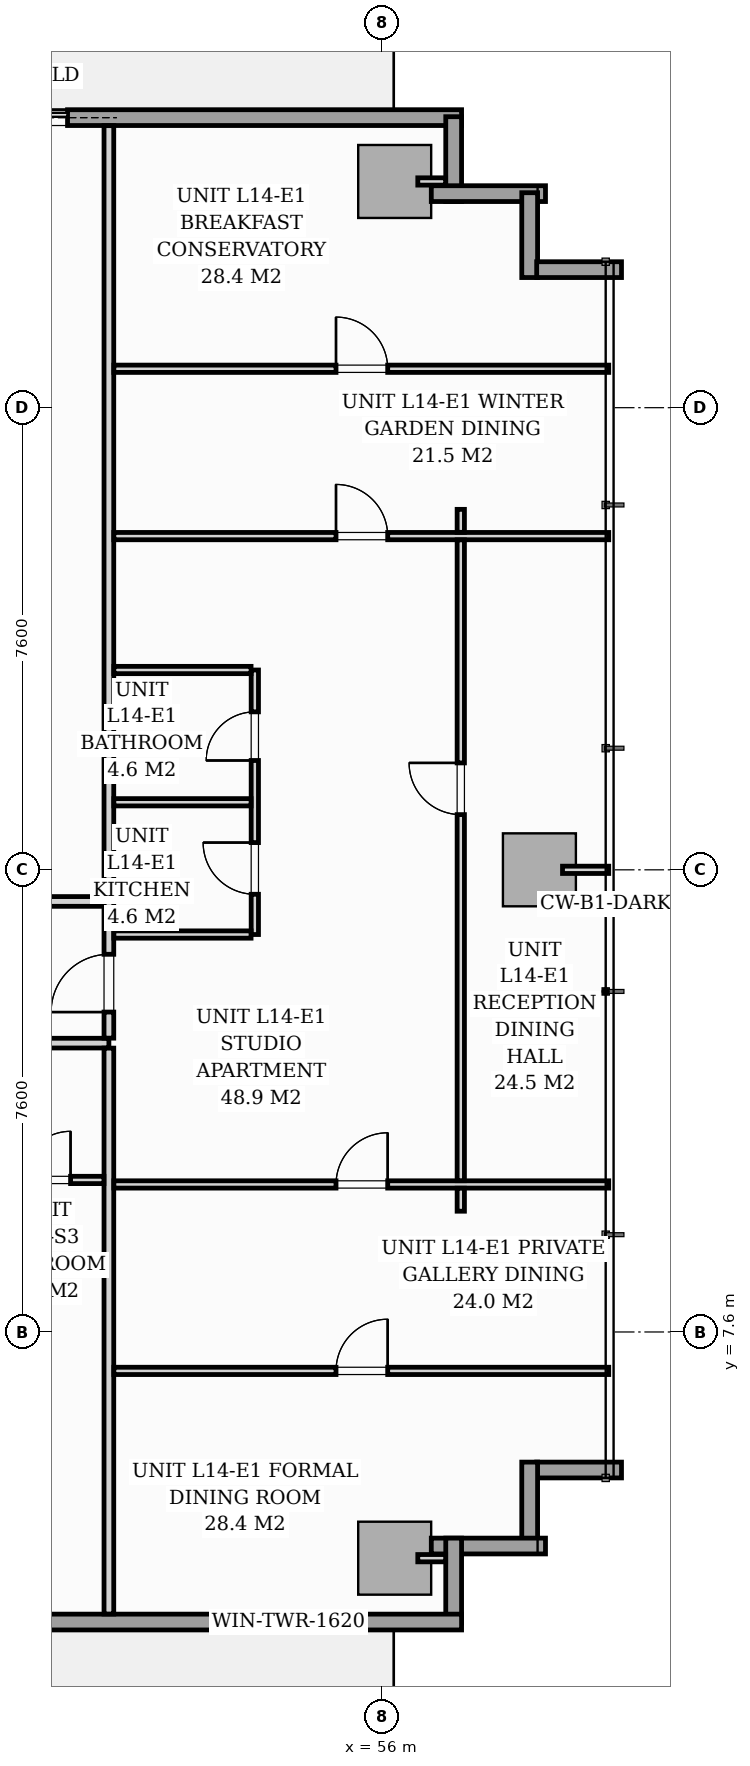
"""IFC4 building model, lengths in metres.
Left out: names, types, materials, properties, quantities, classifications, styles, units other than length and angle.
Written with IfcOpenShell. Run it as: python <this file> out.ifc"""

import sys

from ifc_helpers import new_model, si_unit, direction, frame, frame_2d, origin, origin_2d, place, context, subcontext, project, spatial, rectangle, extrude, source, transform, mapped, element, fill, save


model = new_model("IFC4")
c1 = context("Model", 3, precision=1e-05, world=origin(), true_north=direction((0.0, 1.0)))
c2 = subcontext(c1, "Body", "Model", "MODEL_VIEW")
j1 = project(units=[si_unit("LENGTHUNIT", "METRE"), si_unit("PLANEANGLEUNIT", "RADIAN")], contexts=[c1])
p1 = place(None, origin())
s1 = spatial("IfcSite", under=j1, at=p1, CompositionType="ELEMENT")
p2 = place(p1, origin())
s2 = spatial("IfcBuilding", under=s1, at=p2, CompositionType="ELEMENT")
p3 = place(p2, frame((0.0, 0.0, 51.8)))
s3 = spatial("IfcBuildingStorey", under=s2, at=p3, CompositionType="ELEMENT", Elevation=51.8)
m1 = source(origin(), c2, "Body", "SweptSolid", [
    extrude(rectangle(XDim=1.2, YDim=1.2, at=origin_2d()), origin(), (0.0, 0.0, 1.0), 3.196),
])
for number, where, z_axis, x_axis in (
    (1, (56.2, 3.88, 0.002), (0.0, 0.0, 1.0), (1.0, 0.0, 0.0)),
    (2, (56.2, 26.52, 0.002), (0.0, 0.0, 1.0), (1.0, 0.0, 0.0)),
    (3, (58.58, 15.2, 0.002), (0.0, 0.0, 1.0), (1.0, 0.0, 0.0)),
):
    element("IfcColumn", number, at=place(p3, frame(where, z_axis=z_axis, x_axis=x_axis)), inside=s3, PredefinedType="COLUMN", context=c2, shape_type="MappedRepresentation", body=[
        mapped(m1, transform((0.0, 0.0, 0.0), scale=1.0)),
    ])
p4 = place(p3, frame((40.15, 27.57, 0.0), z_axis=(0.0, 0.0, 1.0), x_axis=(1.0, 0.0, 0.0)))
e4 = element("IfcWall", 4, at=p4, inside=s3, PredefinedType="STANDARD", context=c2, shape_type="SweptSolid", body=[
    extrude(rectangle(XDim=17.15, YDim=0.26, at=frame_2d((8.575, 0.0))), origin(), (0.0, 0.0, 1.0), 2.94),
])
p5 = place(p4, frame((8.87, 0.0, 0.0)))
e5 = element("IfcOpeningElement", 5, at=p5, cuts=e4, PredefinedType="OPENING", context=c2, shape_type="SweptSolid", body=[
    extrude(rectangle(XDim=1.8, YDim=2.06, at=frame_2d((0.9, 1.03))), frame((0.0, 0.14, 0.0), z_axis=(0.0, -1.0, 0.0), x_axis=(1.0, 0.0, 0.0)), (0.0, 0.0, 1.0), 0.28),
])
p6 = place(p4, frame((0.7, 0.0, 0.65)))
e6 = element("IfcOpeningElement", 6, at=p6, cuts=e4, PredefinedType="OPENING", context=c2, shape_type="SweptSolid", body=[
    extrude(rectangle(XDim=1.6, YDim=1.5, at=frame_2d((0.8, 0.75))), frame((0.0, 0.14, 0.0), z_axis=(0.0, -1.0, 0.0), x_axis=(1.0, 0.0, 0.0)), (0.0, 0.0, 1.0), 0.28),
])
p7 = place(p3, frame((57.17, 27.585, 0.0), z_axis=(0.0, 0.0, 1.0), x_axis=(0.0, -1.0, 0.0)))
e7 = element("IfcWall", 7, at=p7, inside=s3, PredefinedType="STANDARD", context=c2, shape_type="SweptSolid", body=[
    extrude(rectangle(XDim=1.395, YDim=0.26, at=frame_2d((0.698, 0.0))), origin(), (0.0, 0.0, 1.0), 2.94),
])
p8 = place(p3, frame((56.802, 26.32, 0.0), z_axis=(0.0, 0.0, 1.0), x_axis=(1.0, 0.0, 0.0)))
e8 = element("IfcWall", 8, at=p8, inside=s3, PredefinedType="STANDARD", context=c2, shape_type="SweptSolid", body=[
    extrude(rectangle(XDim=1.878, YDim=0.26, at=frame_2d((0.939, 0.0))), origin(), (0.0, 0.0, 1.0), 2.94),
])
for number, where, z_axis, x_axis in (
    (9, (58.42, 26.335, 0.0), (0.0, 0.0, 1.0), (0.0, -1.0, 0.0)),
    (10, (58.535, 25.07, 0.0), (0.0, 0.0, 1.0), (1.0, 0.0, 0.0)),
    (11, (59.93, 5.33, 0.0), (0.0, 0.0, 1.0), (-1.0, 0.0, 0.0)),
    (12, (58.42, 5.46, 0.0), (0.0, 0.0, 1.0), (0.0, -1.0, 0.0)),
):
    element("IfcWall", number, at=place(p3, frame(where, z_axis=z_axis, x_axis=x_axis)), inside=s3, PredefinedType="STANDARD", context=c2, shape_type="SweptSolid", body=[
        extrude(rectangle(XDim=1.395, YDim=0.26, at=frame_2d((0.698, 0.0))), origin(), (0.0, 0.0, 1.0), 2.94),
    ])
p9 = place(p3, frame((58.68, 4.08, 0.0), z_axis=(0.0, 0.0, 1.0), x_axis=(-1.0, 0.0, 0.0)))
e13 = element("IfcWall", 13, at=p9, inside=s3, PredefinedType="STANDARD", context=c2, shape_type="SweptSolid", body=[
    extrude(rectangle(XDim=1.878, YDim=0.26, at=frame_2d((0.939, 0.0))), origin(), (0.0, 0.0, 1.0), 2.94),
])
p10 = place(p3, frame((57.17, 4.21, 0.0), z_axis=(0.0, 0.0, 1.0), x_axis=(0.0, -1.0, 0.0)))
e14 = element("IfcWall", 14, at=p10, inside=s3, PredefinedType="STANDARD", context=c2, shape_type="SweptSolid", body=[
    extrude(rectangle(XDim=1.395, YDim=0.26, at=frame_2d((0.698, 0.0))), origin(), (0.0, 0.0, 1.0), 2.94),
])
p11 = place(p3, frame((57.3, 2.83, 0.0), z_axis=(0.0, 0.0, 1.0), x_axis=(-1.0, 0.0, 0.0)))
e15 = element("IfcWall", 15, at=p11, inside=s3, PredefinedType="STANDARD", context=c2, shape_type="SweptSolid", body=[
    extrude(rectangle(XDim=17.15, YDim=0.26, at=frame_2d((8.575, 0.0))), origin(), (0.0, 0.0, 1.0), 2.94),
])
p12 = place(p11, frame((8.034, 0.0, 0.0)))
e16 = element("IfcOpeningElement", 16, at=p12, cuts=e15, PredefinedType="OPENING", context=c2, shape_type="SweptSolid", body=[
    extrude(rectangle(XDim=1.8, YDim=2.06, at=frame_2d((0.9, 1.03))), frame((0.0, 0.14, 0.0), z_axis=(0.0, -1.0, 0.0), x_axis=(1.0, 0.0, 0.0)), (0.0, 0.0, 1.0), 0.28),
])
p13 = place(p11, frame((2.05, 0.0, 0.65)))
e17 = element("IfcOpeningElement", 17, at=p13, cuts=e15, PredefinedType="OPENING", context=c2, shape_type="SweptSolid", body=[
    extrude(rectangle(XDim=1.6, YDim=1.5, at=frame_2d((0.8, 0.75))), frame((0.0, 0.14, 0.0), z_axis=(0.0, -1.0, 0.0), x_axis=(1.0, 0.0, 0.0)), (0.0, 0.0, 1.0), 0.28),
])
p14 = place(p3, frame((16.3, 12.35, 0.0), z_axis=(0.0, 0.0, 1.0), x_axis=(1.0, 0.0, 0.0)))
e18 = element("IfcWall", 18, at=p14, inside=s3, PredefinedType="PARTITIONING", context=c2, shape_type="SweptSolid", body=[
    extrude(rectangle(XDim=35.2, YDim=0.16, at=frame_2d((17.6, 0.0))), origin(), (0.0, 0.0, 1.0), 2.94),
])
p15 = place(p14, frame((6.307, 0.0, 0.0)))
e19 = element("IfcOpeningElement", 19, at=p15, cuts=e18, PredefinedType="OPENING", context=c2, shape_type="SweptSolid", body=[
    extrude(rectangle(XDim=0.95, YDim=2.06, at=frame_2d((0.475, 1.03))), frame((0.0, 0.09, 0.0), z_axis=(0.0, -1.0, 0.0), x_axis=(1.0, 0.0, 0.0)), (0.0, 0.0, 1.0), 0.18),
])
p16 = place(p14, frame((18.392, 0.0, 0.0)))
e20 = element("IfcOpeningElement", 20, at=p16, cuts=e18, PredefinedType="OPENING", context=c2, shape_type="SweptSolid", body=[
    extrude(rectangle(XDim=0.95, YDim=2.06, at=frame_2d((0.475, 1.03))), frame((0.0, 0.09, 0.0), z_axis=(0.0, -1.0, 0.0), x_axis=(1.0, 0.0, 0.0)), (0.0, 0.0, 1.0), 0.18),
])
p17 = place(p14, frame((29.304, 0.0, 0.0)))
e21 = element("IfcOpeningElement", 21, at=p17, cuts=e18, PredefinedType="OPENING", context=c2, shape_type="SweptSolid", body=[
    extrude(rectangle(XDim=0.95, YDim=2.06, at=frame_2d((0.475, 1.03))), frame((0.0, 0.09, 0.0), z_axis=(0.0, -1.0, 0.0), x_axis=(1.0, 0.0, 0.0)), (0.0, 0.0, 1.0), 0.18),
])
p18 = place(p3, frame((51.5, 2.962, 0.0), z_axis=(0.0, 0.0, 1.0), x_axis=(0.0, 1.0, 0.0)))
e22 = element("IfcWall", 22, at=p18, inside=s3, PredefinedType="PARTITIONING", context=c2, shape_type="SweptSolid", body=[
    extrude(rectangle(XDim=9.306, YDim=0.16, at=frame_2d((4.653, 0.0))), origin(), (0.0, 0.0, 1.0), 2.94),
])
p19 = place(p3, frame((51.5, 12.432, 0.0), z_axis=(0.0, 0.0, 1.0), x_axis=(0.0, 1.0, 0.0)))
e23 = element("IfcWall", 23, at=p19, inside=s3, PredefinedType="PARTITIONING", context=c2, shape_type="SweptSolid", body=[
    extrude(rectangle(XDim=15.006, YDim=0.16, at=frame_2d((7.503, 0.0))), origin(), (0.0, 0.0, 1.0), 2.94),
])
p20 = place(p19, frame((0.429, 0.0, 0.0)))
e24 = element("IfcOpeningElement", 24, at=p20, cuts=e23, PredefinedType="OPENING", context=c2, shape_type="SweptSolid", body=[
    extrude(rectangle(XDim=0.95, YDim=2.06, at=frame_2d((0.475, 1.03))), frame((0.0, 0.09, 0.0), z_axis=(0.0, -1.0, 0.0), x_axis=(1.0, 0.0, 0.0)), (0.0, 0.0, 1.0), 0.18),
])
p21 = place(p3, frame((47.32, 10.1, 0.0), z_axis=(0.0, 0.0, 1.0), x_axis=(1.0, 0.0, 0.0)))
e25 = element("IfcWall", 25, at=p21, inside=s3, PredefinedType="PARTITIONING", context=c2, shape_type="SweptSolid", body=[
    extrude(rectangle(XDim=4.098, YDim=0.12, at=frame_2d((2.049, 0.0))), origin(), (0.0, 0.0, 1.0), 2.94),
])
p22 = place(p21, frame((0.675, 0.0, 0.0)))
e26 = element("IfcOpeningElement", 26, at=p22, cuts=e25, PredefinedType="OPENING", context=c2, shape_type="SweptSolid", body=[
    extrude(rectangle(XDim=0.85, YDim=2.05, at=frame_2d((0.425, 1.025))), frame((0.0, 0.07, 0.0), z_axis=(0.0, -1.0, 0.0), x_axis=(1.0, 0.0, 0.0)), (0.0, 0.0, 1.0), 0.14),
])
p23 = place(p21, frame((2.75, 0.0, 0.0)))
e27 = element("IfcOpeningElement", 27, at=p23, cuts=e25, PredefinedType="OPENING", context=c2, shape_type="SweptSolid", body=[
    extrude(rectangle(XDim=0.8, YDim=2.02, at=frame_2d((0.4, 1.01))), frame((0.0, 0.07, 0.0), z_axis=(0.0, -1.0, 0.0), x_axis=(1.0, 0.0, 0.0)), (0.0, 0.0, 1.0), 0.14),
])
p24 = place(p3, frame((53.9, 14.136, 0.0), z_axis=(0.0, 0.0, 1.0), x_axis=(0.0, 1.0, 0.0)))
e28 = element("IfcWall", 28, at=p24, inside=s3, PredefinedType="PARTITIONING", context=c2, shape_type="SweptSolid", body=[
    extrude(rectangle(XDim=4.35, YDim=0.12, at=frame_2d((2.175, 0.0))), origin(), (0.0, 0.0, 1.0), 2.94),
])
p25 = place(p24, frame((0.662, 0.0, 0.0)))
e29 = element("IfcOpeningElement", 29, at=p25, cuts=e28, PredefinedType="OPENING", context=c2, shape_type="SweptSolid", body=[
    extrude(rectangle(XDim=0.85, YDim=2.05, at=frame_2d((0.425, 1.025))), frame((0.0, 0.07, 0.0), z_axis=(0.0, -1.0, 0.0), x_axis=(1.0, 0.0, 0.0)), (0.0, 0.0, 1.0), 0.14),
])
p26 = place(p24, frame((2.862, 0.0, 0.0)))
e30 = element("IfcOpeningElement", 30, at=p26, cuts=e28, PredefinedType="OPENING", context=c2, shape_type="SweptSolid", body=[
    extrude(rectangle(XDim=0.8, YDim=2.02, at=frame_2d((0.4, 1.01))), frame((0.0, 0.07, 0.0), z_axis=(0.0, -1.0, 0.0), x_axis=(1.0, 0.0, 0.0)), (0.0, 0.0, 1.0), 0.14),
])
p27 = place(p3, frame((51.582, 16.311, 0.0), z_axis=(0.0, 0.0, 1.0), x_axis=(1.0, 0.0, 0.0)))
e31 = element("IfcWall", 31, at=p27, inside=s3, PredefinedType="PARTITIONING", context=c2, shape_type="SweptSolid", body=[
    extrude(rectangle(XDim=2.256, YDim=0.12, at=frame_2d((1.128, 0.0))), origin(), (0.0, 0.0, 1.0), 2.045),
])
for number, where, z_axis, x_axis in (
    (32, (51.582, 14.136, 0.0), (0.0, 0.0, 1.0), (1.0, 0.0, 0.0)),
    (33, (51.582, 18.486, 0.0), (0.0, 0.0, 1.0), (1.0, 0.0, 0.0)),
):
    element("IfcWall", number, at=place(p3, frame(where, z_axis=z_axis, x_axis=x_axis)), inside=s3, PredefinedType="PARTITIONING", context=c2, shape_type="SweptSolid", body=[
        extrude(rectangle(XDim=2.256, YDim=0.12, at=frame_2d((1.128, 0.0))), origin(), (0.0, 0.0, 1.0), 2.94),
    ])
p28 = place(p3, frame((51.582, 6.96, 0.0), z_axis=(0.0, 0.0, 1.0), x_axis=(1.0, 0.0, 0.0)))
e34 = element("IfcWall", 34, at=p28, inside=s3, PredefinedType="PARTITIONING", context=c2, shape_type="SweptSolid", body=[
    extrude(rectangle(XDim=8.138, YDim=0.12, at=frame_2d((4.069, 0.0))), origin(), (0.0, 0.0, 1.0), 2.94),
])
p29 = place(p28, frame((3.653, 0.0, 0.0)))
e35 = element("IfcOpeningElement", 35, at=p29, cuts=e34, PredefinedType="OPENING", context=c2, shape_type="SweptSolid", body=[
    extrude(rectangle(XDim=0.85, YDim=2.05, at=frame_2d((0.425, 1.025))), frame((0.0, 0.07, 0.0), z_axis=(0.0, -1.0, 0.0), x_axis=(1.0, 0.0, 0.0)), (0.0, 0.0, 1.0), 0.14),
])
p30 = place(p3, frame((51.582, 23.44, 0.0), z_axis=(0.0, 0.0, 1.0), x_axis=(1.0, 0.0, 0.0)))
e36 = element("IfcWall", 36, at=p30, inside=s3, PredefinedType="PARTITIONING", context=c2, shape_type="SweptSolid", body=[
    extrude(rectangle(XDim=8.138, YDim=0.12, at=frame_2d((4.069, 0.0))), origin(), (0.0, 0.0, 1.0), 2.94),
])
p31 = place(p30, frame((3.653, 0.0, 0.0)))
e37 = element("IfcOpeningElement", 37, at=p31, cuts=e36, PredefinedType="OPENING", context=c2, shape_type="SweptSolid", body=[
    extrude(rectangle(XDim=0.85, YDim=2.05, at=frame_2d((0.425, 1.025))), frame((0.0, 0.07, 0.0), z_axis=(0.0, -1.0, 0.0), x_axis=(1.0, 0.0, 0.0)), (0.0, 0.0, 1.0), 0.14),
])
p32 = place(p3, frame((51.582, 10.026, 0.0), z_axis=(0.0, 0.0, 1.0), x_axis=(1.0, 0.0, 0.0)))
e38 = element("IfcWall", 38, at=p32, inside=s3, PredefinedType="PARTITIONING", context=c2, shape_type="SweptSolid", body=[
    extrude(rectangle(XDim=8.138, YDim=0.12, at=frame_2d((4.069, 0.0))), origin(), (0.0, 0.0, 1.0), 2.94),
])
p33 = place(p32, frame((3.653, 0.0, 0.0)))
e39 = element("IfcOpeningElement", 39, at=p33, cuts=e38, PredefinedType="OPENING", context=c2, shape_type="SweptSolid", body=[
    extrude(rectangle(XDim=0.85, YDim=2.05, at=frame_2d((0.425, 1.025))), frame((0.0, 0.07, 0.0), z_axis=(0.0, -1.0, 0.0), x_axis=(1.0, 0.0, 0.0)), (0.0, 0.0, 1.0), 0.14),
])
p34 = place(p3, frame((51.582, 20.688, 0.0), z_axis=(0.0, 0.0, 1.0), x_axis=(1.0, 0.0, 0.0)))
e40 = element("IfcWall", 40, at=p34, inside=s3, PredefinedType="PARTITIONING", context=c2, shape_type="SweptSolid", body=[
    extrude(rectangle(XDim=8.138, YDim=0.12, at=frame_2d((4.069, 0.0))), origin(), (0.0, 0.0, 1.0), 2.94),
])
p35 = place(p34, frame((3.653, 0.0, 0.0)))
e41 = element("IfcOpeningElement", 41, at=p35, cuts=e40, PredefinedType="OPENING", context=c2, shape_type="SweptSolid", body=[
    extrude(rectangle(XDim=0.85, YDim=2.05, at=frame_2d((0.425, 1.025))), frame((0.0, 0.07, 0.0), z_axis=(0.0, -1.0, 0.0), x_axis=(1.0, 0.0, 0.0)), (0.0, 0.0, 1.0), 0.14),
])
p36 = place(p3, frame((57.287, 9.586, 0.0), z_axis=(0.0, 0.0, 1.0), x_axis=(0.0, 1.0, 0.0)))
e42 = element("IfcWall", 42, at=p36, inside=s3, PredefinedType="PARTITIONING", context=c2, shape_type="SweptSolid", body=[
    extrude(rectangle(XDim=0.378, YDim=0.12, at=frame_2d((0.189, 0.0))), origin(), (0.0, 0.0, 1.0), 2.94),
])
p37 = place(p3, frame((57.287, 10.088, 0.0), z_axis=(0.0, 0.0, 1.0), x_axis=(0.0, 1.0, 0.0)))
e43 = element("IfcWall", 43, at=p37, inside=s3, PredefinedType="PARTITIONING", context=c2, shape_type="SweptSolid", body=[
    extrude(rectangle(XDim=10.538, YDim=0.12, at=frame_2d((5.269, 0.0))), origin(), (0.0, 0.0, 1.0), 2.94),
])
p38 = place(p37, frame((6.02, 0.0, 0.0)))
e44 = element("IfcOpeningElement", 44, at=p38, cuts=e43, PredefinedType="OPENING", context=c2, shape_type="SweptSolid", body=[
    extrude(rectangle(XDim=0.85, YDim=2.05, at=frame_2d((0.425, 1.025))), frame((0.0, 0.07, 0.0), z_axis=(0.0, -1.0, 0.0), x_axis=(1.0, 0.0, 0.0)), (0.0, 0.0, 1.0), 0.14),
])
p39 = place(p3, frame((57.287, 20.75, 0.0), z_axis=(0.0, 0.0, 1.0), x_axis=(0.0, 1.0, 0.0)))
e45 = element("IfcWall", 45, at=p39, inside=s3, PredefinedType="PARTITIONING", context=c2, shape_type="SweptSolid", body=[
    extrude(rectangle(XDim=0.378, YDim=0.12, at=frame_2d((0.189, 0.0))), origin(), (0.0, 0.0, 1.0), 2.31),
])
p40 = place(p3, frame((45.84, 14.68, 0.0), z_axis=(0.0, 0.0, 1.0), x_axis=(1.0, 0.0, 0.0)))
e46 = element("IfcWall", 46, at=p40, inside=s3, PredefinedType="PARTITIONING", context=c2, shape_type="SweptSolid", body=[
    extrude(rectangle(XDim=5.578, YDim=0.16, at=frame_2d((2.789, 0.0))), origin(), (0.0, 0.0, 1.0), 2.94),
])
p41 = place(p40, frame((2.415, 0.0, 0.0)))
e47 = element("IfcOpeningElement", 47, at=p41, cuts=e46, PredefinedType="OPENING", context=c2, shape_type="SweptSolid", body=[
    extrude(rectangle(XDim=0.95, YDim=2.06, at=frame_2d((0.475, 1.03))), frame((0.0, 0.09, 0.0), z_axis=(0.0, -1.0, 0.0), x_axis=(1.0, 0.0, 0.0)), (0.0, 0.0, 1.0), 0.18),
])
for number, where, z_axis, x_axis in (
    (48, (56.58, 3.88, 0.0), (0.0, 0.0, 1.0), (1.0, 0.0, 0.0)),
    (49, (56.58, 26.52, 0.0), (0.0, 0.0, 1.0), (1.0, 0.0, 0.0)),
):
    element("IfcWall", number, at=place(p3, frame(where, z_axis=z_axis, x_axis=x_axis)), inside=s3, PredefinedType="PARTITIONING", context=c2, shape_type="SweptSolid", body=[
        extrude(rectangle(XDim=0.458, YDim=0.12, at=frame_2d((0.229, 0.0))), origin(), (0.0, 0.0, 1.0), 2.94),
    ])
p42 = place(p3, frame((58.96, 15.2, 0.0), z_axis=(0.0, 0.0, 1.0), x_axis=(1.0, 0.0, 0.0)))
e50 = element("IfcWall", 50, at=p42, inside=s3, PredefinedType="PARTITIONING", context=c2, shape_type="SweptSolid", body=[
    extrude(rectangle(XDim=0.76, YDim=0.12, at=frame_2d((0.38, 0.0))), origin(), (0.0, 0.0, 1.0), 2.94),
])
m2 = source(origin(), c2, "Body", "SweptSolid", [
    extrude(rectangle(XDim=1.8, YDim=2.06, at=frame_2d((0.9, 1.03))), frame((0.0, 0.025, 0.0), z_axis=(0.0, -1.0, 0.0), x_axis=(1.0, 0.0, 0.0)), (0.0, 0.0, 1.0), 0.05),
])
p43 = place(p5, origin())
e51 = element("IfcDoor", 51, at=p43, inside=s3, OperationType="SLIDING_TO_RIGHT", PredefinedType="DOOR", context=c2, shape_type="MappedRepresentation", body=[
    mapped(m2, transform((0.0, 0.0, 0.0), scale=1.0)),
])
fill(e5, e51)
m3 = source(origin(), c2, "Body", "SweptSolid", [
    extrude(rectangle(XDim=1.6, YDim=1.5, at=frame_2d((0.8, 0.75))), frame((0.0, 0.03, 0.0), z_axis=(0.0, -1.0, 0.0), x_axis=(1.0, 0.0, 0.0)), (0.0, 0.0, 1.0), 0.06),
])
p44 = place(p13, origin())
e52 = element("IfcWindow", 52, at=p44, inside=s3, PartitioningType="SINGLE_PANEL", PredefinedType="WINDOW", context=c2, shape_type="MappedRepresentation", body=[
    mapped(m3, transform((0.0, 0.0, 0.0), scale=1.0)),
])
fill(e17, e52)
m4 = source(origin(), c2, "Body", "SweptSolid", [
    extrude(rectangle(XDim=0.8, YDim=2.02, at=frame_2d((0.4, 1.01))), frame((0.0, 0.025, 0.0), z_axis=(0.0, -1.0, 0.0), x_axis=(1.0, 0.0, 0.0)), (0.0, 0.0, 1.0), 0.05),
])
p45 = place(p23, origin())
e53 = element("IfcDoor", 53, at=p45, inside=s3, OperationType="SINGLE_SWING_RIGHT", PredefinedType="DOOR", context=c2, shape_type="MappedRepresentation", body=[
    mapped(m4, transform((0.0, 0.0, 0.0), scale=1.0)),
])
fill(e27, e53)
m5 = source(origin(), c2, "Body", "SweptSolid", [
    extrude(rectangle(XDim=0.95, YDim=2.06, at=frame_2d((0.475, 1.03))), frame((0.0, 0.025, 0.0), z_axis=(0.0, -1.0, 0.0), x_axis=(1.0, 0.0, 0.0)), (0.0, 0.0, 1.0), 0.05),
])
p46 = place(p20, origin())
e54 = element("IfcDoor", 54, at=p46, inside=s3, OperationType="SINGLE_SWING_LEFT", PredefinedType="DOOR", context=c2, shape_type="MappedRepresentation", body=[
    mapped(m5, transform((0.0, 0.0, 0.0), scale=1.0)),
])
fill(e24, e54)
m6 = source(origin(), c2, "Body", "SweptSolid", [
    extrude(rectangle(XDim=0.85, YDim=2.05, at=frame_2d((0.425, 1.025))), frame((0.0, 0.025, 0.0), z_axis=(0.0, -1.0, 0.0), x_axis=(1.0, 0.0, 0.0)), (0.0, 0.0, 1.0), 0.05),
])
p47 = place(p25, origin())
e55 = element("IfcDoor", 55, at=p47, inside=s3, OperationType="SINGLE_SWING_RIGHT", PredefinedType="DOOR", context=c2, shape_type="MappedRepresentation", body=[
    mapped(m6, transform((0.0, 0.0, 0.0), scale=1.0)),
])
fill(e29, e55)
p48 = place(p26, origin())
e56 = element("IfcDoor", 56, at=p48, inside=s3, OperationType="SINGLE_SWING_LEFT", PredefinedType="DOOR", context=c2, shape_type="MappedRepresentation", body=[
    mapped(m4, transform((0.0, 0.0, 0.0), scale=1.0)),
])
fill(e30, e56)
p49 = place(p29, origin())
e57 = element("IfcDoor", 57, at=p49, inside=s3, OperationType="SINGLE_SWING_RIGHT", PredefinedType="DOOR", context=c2, shape_type="MappedRepresentation", body=[
    mapped(m6, transform((0.0, 0.0, 0.0), scale=1.0)),
])
fill(e35, e57)
p50 = place(p31, origin())
e58 = element("IfcDoor", 58, at=p50, inside=s3, OperationType="SINGLE_SWING_LEFT", PredefinedType="DOOR", context=c2, shape_type="MappedRepresentation", body=[
    mapped(m6, transform((0.0, 0.0, 0.0), scale=1.0)),
])
fill(e37, e58)
p51 = place(p33, origin())
e59 = element("IfcDoor", 59, at=p51, inside=s3, OperationType="SINGLE_SWING_RIGHT", PredefinedType="DOOR", context=c2, shape_type="MappedRepresentation", body=[
    mapped(m6, transform((0.0, 0.0, 0.0), scale=1.0)),
])
fill(e39, e59)
p52 = place(p35, origin())
e60 = element("IfcDoor", 60, at=p52, inside=s3, OperationType="SINGLE_SWING_LEFT", PredefinedType="DOOR", context=c2, shape_type="MappedRepresentation", body=[
    mapped(m6, transform((0.0, 0.0, 0.0), scale=1.0)),
])
fill(e41, e60)
p53 = place(p38, origin())
e61 = element("IfcDoor", 61, at=p53, inside=s3, OperationType="SINGLE_SWING_RIGHT", PredefinedType="DOOR", context=c2, shape_type="MappedRepresentation", body=[
    mapped(m6, transform((0.0, 0.0, 0.0), scale=1.0)),
])
fill(e44, e61)
save(model, sys.argv[1])
